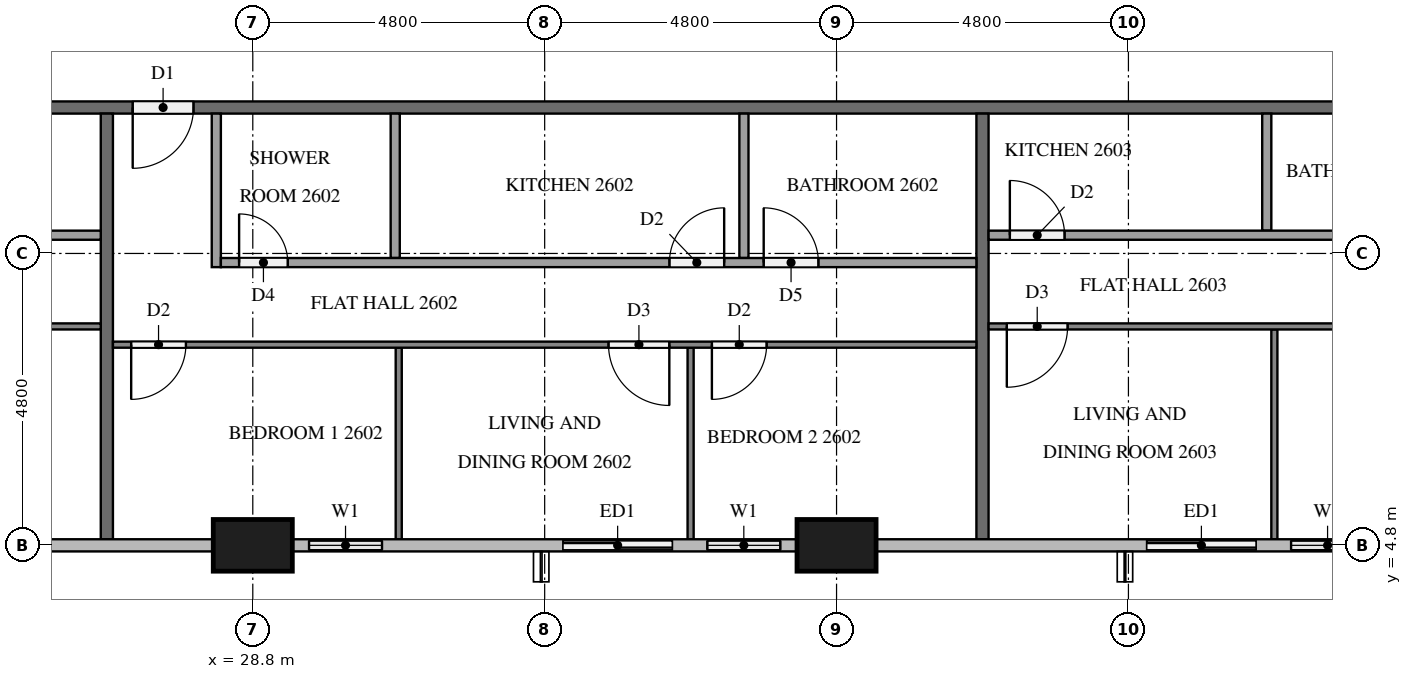
"""IFC4 building model, lengths in metres.
Left out: names, types, materials, properties, quantities, classifications, styles, units other than length and angle.
Written with IfcOpenShell. Run it as: python <this file> out.ifc"""

import sys

from ifc_helpers import new_model, si_unit, direction, frame, frame_2d, origin, origin_2d, place, context, subcontext, project, spatial, rectangle, extrude, element, fill, save


model = new_model("IFC4")
c1 = context("Model", 3, precision=1e-05, world=origin(), true_north=direction((0.0, 1.0)))
c2 = subcontext(c1, "Body", "Model", "MODEL_VIEW")
j1 = project(units=[si_unit("LENGTHUNIT", "METRE"), si_unit("PLANEANGLEUNIT", "RADIAN")], contexts=[c1])
p1 = place(None, origin())
s1 = spatial("IfcSite", under=j1, at=p1, CompositionType="ELEMENT")
p2 = place(p1, origin())
s2 = spatial("IfcBuilding", under=s1, at=p2, CompositionType="ELEMENT")
p3 = place(p2, frame((0.0, 0.0, 103.2)))
s3 = spatial("IfcBuildingStorey", under=s2, at=p3, CompositionType="ELEMENT", Elevation=103.2)
for number, where, z_axis, x_axis in (
    (1, (28.8, 4.8, 0.0), (0.0, 0.0, 1.0), (1.0, 0.0, 0.0)),
    (2, (38.4, 4.8, 0.0), (0.0, 0.0, 1.0), (1.0, 0.0, 0.0)),
):
    element("IfcColumn", number, at=place(p3, frame(where, z_axis=z_axis, x_axis=x_axis)), inside=s3, PredefinedType="COLUMN", context=c2, shape_type="SweptSolid", body=[
        extrude(rectangle(XDim=1.3, YDim=0.85, at=origin_2d()), origin(), (0.0, 0.0, 1.0), 3.2),
    ])
p4 = place(p3, frame((29.45, 4.8, 0.0), z_axis=(0.0, 0.0, 1.0), x_axis=(1.0, 0.0, 0.0)))
e3 = element("IfcWall", 3, at=p4, inside=s3, PredefinedType="SOLIDWALL", context=c2, shape_type="SweptSolid", body=[
    extrude(rectangle(XDim=1.75, YDim=0.15, at=frame_2d((0.875, 0.0))), origin(), (0.0, 0.0, 1.0), 3.2),
])
p5 = place(p4, frame((0.275, 0.0, 0.9)))
e4 = element("IfcOpeningElement", 4, at=p5, cuts=e3, PredefinedType="OPENING", context=c2, shape_type="SweptSolid", body=[
    extrude(rectangle(XDim=1.2, YDim=1.4, at=frame_2d((0.6, 0.7))), frame((0.0, 0.085, 0.0), z_axis=(0.0, -1.0, 0.0), x_axis=(1.0, 0.0, 0.0)), (0.0, 0.0, 1.0), 0.17),
])
p6 = place(p3, frame((33.6, 4.8, 0.0), z_axis=(0.0, 0.0, 1.0), x_axis=(1.0, 0.0, 0.0)))
e5 = element("IfcWall", 5, at=p6, inside=s3, PredefinedType="SOLIDWALL", context=c2, shape_type="SweptSolid", body=[
    extrude(rectangle(XDim=4.15, YDim=0.15, at=frame_2d((2.075, 0.0))), origin(), (0.0, 0.0, 1.0), 3.2),
])
p7 = place(p6, frame((0.3, 0.0, 0.0)))
e6 = element("IfcOpeningElement", 6, at=p7, cuts=e5, PredefinedType="OPENING", context=c2, shape_type="SweptSolid", body=[
    extrude(rectangle(XDim=1.8, YDim=2.4, at=frame_2d((0.9, 1.2))), frame((0.0, 0.085, 0.0), z_axis=(0.0, -1.0, 0.0), x_axis=(1.0, 0.0, 0.0)), (0.0, 0.0, 1.0), 0.17),
])
p8 = place(p6, frame((2.675, 0.0, 0.9)))
e7 = element("IfcOpeningElement", 7, at=p8, cuts=e5, PredefinedType="OPENING", context=c2, shape_type="SweptSolid", body=[
    extrude(rectangle(XDim=1.2, YDim=1.4, at=frame_2d((0.6, 0.7))), frame((0.0, 0.085, 0.0), z_axis=(0.0, -1.0, 0.0), x_axis=(1.0, 0.0, 0.0)), (0.0, 0.0, 1.0), 0.17),
])
p9 = place(p3, frame((43.2, 4.8, 0.0), z_axis=(0.0, 0.0, 1.0), x_axis=(1.0, 0.0, 0.0)))
e8 = element("IfcWall", 8, at=p9, inside=s3, PredefinedType="SOLIDWALL", context=c2, shape_type="SweptSolid", body=[
    extrude(rectangle(XDim=4.15, YDim=0.15, at=frame_2d((2.075, 0.0))), origin(), (0.0, 0.0, 1.0), 3.2),
])
p10 = place(p9, frame((0.3, 0.0, 0.0)))
e9 = element("IfcOpeningElement", 9, at=p10, cuts=e8, PredefinedType="OPENING", context=c2, shape_type="SweptSolid", body=[
    extrude(rectangle(XDim=1.8, YDim=2.4, at=frame_2d((0.9, 1.2))), frame((0.0, 0.085, 0.0), z_axis=(0.0, -1.0, 0.0), x_axis=(1.0, 0.0, 0.0)), (0.0, 0.0, 1.0), 0.17),
])
p11 = place(p9, frame((2.675, 0.0, 0.9)))
e10 = element("IfcOpeningElement", 10, at=p11, cuts=e8, PredefinedType="OPENING", context=c2, shape_type="SweptSolid", body=[
    extrude(rectangle(XDim=1.2, YDim=1.4, at=frame_2d((0.6, 0.7))), frame((0.0, 0.085, 0.0), z_axis=(0.0, -1.0, 0.0), x_axis=(1.0, 0.0, 0.0)), (0.0, 0.0, 1.0), 0.17),
])
p12 = place(p3, frame((50.5, 12.0, 0.0), z_axis=(0.0, 0.0, 1.0), x_axis=(-1.0, 0.0, 0.0)))
e11 = element("IfcWall", 11, at=p12, inside=s3, PredefinedType="PARTITIONING", context=c2, shape_type="SweptSolid", body=[
    extrude(rectangle(XDim=38.6, YDim=0.2, at=frame_2d((19.3, 0.0))), origin(), (0.0, 0.0, 1.0), 3.2),
])
p13 = place(p12, frame((37.075, 0.0, 0.0)))
e12 = element("IfcOpeningElement", 12, at=p13, cuts=e11, PredefinedType="OPENING", context=c2, shape_type="SweptSolid", body=[
    extrude(rectangle(XDim=1.0, YDim=2.1, at=frame_2d((0.5, 1.05))), frame((0.0, 0.11, 0.0), z_axis=(0.0, -1.0, 0.0), x_axis=(1.0, 0.0, 0.0)), (0.0, 0.0, 1.0), 0.22),
])
p14 = place(p12, frame((22.675, 0.0, 0.0)))
e13 = element("IfcOpeningElement", 13, at=p14, cuts=e11, PredefinedType="OPENING", context=c2, shape_type="SweptSolid", body=[
    extrude(rectangle(XDim=1.0, YDim=2.1, at=frame_2d((0.5, 1.05))), frame((0.0, 0.11, 0.0), z_axis=(0.0, -1.0, 0.0), x_axis=(1.0, 0.0, 0.0)), (0.0, 0.0, 1.0), 0.22),
])
p15 = place(p12, frame((0.525, 0.0, 0.0)))
e14 = element("IfcOpeningElement", 14, at=p15, cuts=e11, PredefinedType="OPENING", context=c2, shape_type="SweptSolid", body=[
    extrude(rectangle(XDim=1.0, YDim=2.1, at=frame_2d((0.5, 1.05))), frame((0.0, 0.11, 0.0), z_axis=(0.0, -1.0, 0.0), x_axis=(1.0, 0.0, 0.0)), (0.0, 0.0, 1.0), 0.22),
])
for number, where, z_axis, x_axis in (
    (15, (26.4, 11.9, 0.0), (0.0, 0.0, 1.0), (0.0, -1.0, 0.0)),
    (16, (40.8, 11.9, 0.0), (0.0, 0.0, 1.0), (0.0, -1.0, 0.0)),
):
    element("IfcWall", number, at=place(p3, frame(where, z_axis=z_axis, x_axis=x_axis)), inside=s3, PredefinedType="PARTITIONING", context=c2, shape_type="SweptSolid", body=[
        extrude(rectangle(XDim=7.0, YDim=0.2, at=frame_2d((3.5, 0.0))), origin(), (0.0, 0.0, 1.0), 3.2),
    ])
p16 = place(p3, frame((26.3, 8.4, 0.0), z_axis=(0.0, 0.0, 1.0), x_axis=(-1.0, 0.0, 0.0)))
e17 = element("IfcWall", 17, at=p16, inside=s3, PredefinedType="PARTITIONING", context=c2, shape_type="SweptSolid", body=[
    extrude(rectangle(XDim=14.2, YDim=0.1, at=frame_2d((7.1, 0.0))), origin(), (0.0, 0.0, 1.0), 3.2),
])
p17 = place(p16, frame((12.9, 0.0, 0.0)))
e18 = element("IfcOpeningElement", 18, at=p17, cuts=e17, PredefinedType="OPENING", context=c2, shape_type="SweptSolid", body=[
    extrude(rectangle(XDim=1.0, YDim=2.1, at=frame_2d((0.5, 1.05))), frame((0.0, 0.06, 0.0), z_axis=(0.0, -1.0, 0.0), x_axis=(1.0, 0.0, 0.0)), (0.0, 0.0, 1.0), 0.12),
])
p18 = place(p16, frame((5.05, 0.0, 0.0)))
e19 = element("IfcOpeningElement", 19, at=p18, cuts=e17, PredefinedType="OPENING", context=c2, shape_type="SweptSolid", body=[
    extrude(rectangle(XDim=0.9, YDim=2.1, at=frame_2d((0.45, 1.05))), frame((0.0, 0.06, 0.0), z_axis=(0.0, -1.0, 0.0), x_axis=(1.0, 0.0, 0.0)), (0.0, 0.0, 1.0), 0.12),
])
p19 = place(p16, frame((3.45, 0.0, 0.0)))
e20 = element("IfcOpeningElement", 20, at=p19, cuts=e17, PredefinedType="OPENING", context=c2, shape_type="SweptSolid", body=[
    extrude(rectangle(XDim=0.9, YDim=2.1, at=frame_2d((0.45, 1.05))), frame((0.0, 0.06, 0.0), z_axis=(0.0, -1.0, 0.0), x_axis=(1.0, 0.0, 0.0)), (0.0, 0.0, 1.0), 0.12),
])
p20 = place(p3, frame((13.875, 9.9, 0.0), z_axis=(0.0, 0.0, 1.0), x_axis=(1.0, 0.0, 0.0)))
e21 = element("IfcWall", 21, at=p20, inside=s3, PredefinedType="PARTITIONING", context=c2, shape_type="SweptSolid", body=[
    extrude(rectangle(XDim=12.425, YDim=0.15, at=frame_2d((6.212, 0.0))), origin(), (0.0, 0.0, 1.0), 3.2),
])
p21 = place(p20, frame((0.3, 0.0, 0.0)))
e22 = element("IfcOpeningElement", 22, at=p21, cuts=e21, PredefinedType="OPENING", context=c2, shape_type="SweptSolid", body=[
    extrude(rectangle(XDim=0.8, YDim=2.1, at=frame_2d((0.4, 1.05))), frame((0.0, 0.085, 0.0), z_axis=(0.0, -1.0, 0.0), x_axis=(1.0, 0.0, 0.0)), (0.0, 0.0, 1.0), 0.17),
])
p22 = place(p20, frame((5.465, 0.0, 0.0)))
e23 = element("IfcOpeningElement", 23, at=p22, cuts=e21, PredefinedType="OPENING", context=c2, shape_type="SweptSolid", body=[
    extrude(rectangle(XDim=0.9, YDim=2.1, at=frame_2d((0.45, 1.05))), frame((0.0, 0.085, 0.0), z_axis=(0.0, -1.0, 0.0), x_axis=(1.0, 0.0, 0.0)), (0.0, 0.0, 1.0), 0.17),
])
p23 = place(p20, frame((7.015, 0.0, 0.0)))
e24 = element("IfcOpeningElement", 24, at=p23, cuts=e21, PredefinedType="OPENING", context=c2, shape_type="SweptSolid", body=[
    extrude(rectangle(XDim=0.9, YDim=2.1, at=frame_2d((0.45, 1.05))), frame((0.0, 0.085, 0.0), z_axis=(0.0, -1.0, 0.0), x_axis=(1.0, 0.0, 0.0)), (0.0, 0.0, 1.0), 0.17),
])
for number, where, z_axis, x_axis in (
    (25, (31.2, 8.05, 0.0), (0.0, 0.0, 1.0), (0.0, -1.0, 0.0)),
    (26, (36.0, 8.05, 0.0), (0.0, 0.0, 1.0), (0.0, -1.0, 0.0)),
):
    element("IfcWall", number, at=place(p3, frame(where, z_axis=z_axis, x_axis=x_axis)), inside=s3, PredefinedType="PARTITIONING", context=c2, shape_type="SweptSolid", body=[
        extrude(rectangle(XDim=3.15, YDim=0.1, at=frame_2d((1.575, 0.0))), origin(), (0.0, 0.0, 1.0), 3.2),
    ])
p24 = place(p3, frame((40.7, 8.1, 0.0), z_axis=(0.0, 0.0, 1.0), x_axis=(-1.0, 0.0, 0.0)))
e27 = element("IfcWall", 27, at=p24, inside=s3, PredefinedType="PARTITIONING", context=c2, shape_type="SweptSolid", body=[
    extrude(rectangle(XDim=14.2, YDim=0.1, at=frame_2d((7.1, 0.0))), origin(), (0.0, 0.0, 1.0), 3.2),
])
p25 = place(p24, frame((13.0, 0.0, 0.0)))
e28 = element("IfcOpeningElement", 28, at=p25, cuts=e27, PredefinedType="OPENING", context=c2, shape_type="SweptSolid", body=[
    extrude(rectangle(XDim=0.9, YDim=2.1, at=frame_2d((0.45, 1.05))), frame((0.0, 0.06, 0.0), z_axis=(0.0, -1.0, 0.0), x_axis=(1.0, 0.0, 0.0)), (0.0, 0.0, 1.0), 0.12),
])
p26 = place(p24, frame((5.05, 0.0, 0.0)))
e29 = element("IfcOpeningElement", 29, at=p26, cuts=e27, PredefinedType="OPENING", context=c2, shape_type="SweptSolid", body=[
    extrude(rectangle(XDim=1.0, YDim=2.1, at=frame_2d((0.5, 1.05))), frame((0.0, 0.06, 0.0), z_axis=(0.0, -1.0, 0.0), x_axis=(1.0, 0.0, 0.0)), (0.0, 0.0, 1.0), 0.12),
])
p27 = place(p24, frame((3.45, 0.0, 0.0)))
e30 = element("IfcOpeningElement", 30, at=p27, cuts=e27, PredefinedType="OPENING", context=c2, shape_type="SweptSolid", body=[
    extrude(rectangle(XDim=0.9, YDim=2.1, at=frame_2d((0.45, 1.05))), frame((0.0, 0.06, 0.0), z_axis=(0.0, -1.0, 0.0), x_axis=(1.0, 0.0, 0.0)), (0.0, 0.0, 1.0), 0.12),
])
for number, where, z_axis, x_axis in (
    (31, (31.142, 11.9, 0.0), (0.0, 0.0, 1.0), (0.0, -1.0, 0.0)),
    (32, (36.877, 11.9, 0.0), (0.0, 0.0, 1.0), (0.0, -1.0, 0.0)),
):
    element("IfcWall", number, at=place(p3, frame(where, z_axis=z_axis, x_axis=x_axis)), inside=s3, PredefinedType="PARTITIONING", context=c2, shape_type="SweptSolid", body=[
        extrude(rectangle(XDim=2.375, YDim=0.15, at=frame_2d((1.188, 0.0))), origin(), (0.0, 0.0, 1.0), 3.2),
    ])
p28 = place(p3, frame((28.2, 11.9, 0.0), z_axis=(0.0, 0.0, 1.0), x_axis=(0.0, -1.0, 0.0)))
e33 = element("IfcWall", 33, at=p28, inside=s3, PredefinedType="PARTITIONING", context=c2, shape_type="SweptSolid", body=[
    extrude(rectangle(XDim=2.525, YDim=0.15, at=frame_2d((1.262, 0.0))), origin(), (0.0, 0.0, 1.0), 3.2),
])
p29 = place(p3, frame((28.275, 9.45, 0.0), z_axis=(0.0, 0.0, 1.0), x_axis=(1.0, 0.0, 0.0)))
e34 = element("IfcWall", 34, at=p29, inside=s3, PredefinedType="PARTITIONING", context=c2, shape_type="SweptSolid", body=[
    extrude(rectangle(XDim=12.425, YDim=0.15, at=frame_2d((6.212, 0.0))), origin(), (0.0, 0.0, 1.0), 3.2),
])
p30 = place(p29, frame((0.3, 0.0, 0.0)))
e35 = element("IfcOpeningElement", 35, at=p30, cuts=e34, PredefinedType="OPENING", context=c2, shape_type="SweptSolid", body=[
    extrude(rectangle(XDim=0.8, YDim=2.1, at=frame_2d((0.4, 1.05))), frame((0.0, 0.085, 0.0), z_axis=(0.0, -1.0, 0.0), x_axis=(1.0, 0.0, 0.0)), (0.0, 0.0, 1.0), 0.17),
])
p31 = place(p29, frame((7.377, 0.0, 0.0)))
e36 = element("IfcOpeningElement", 36, at=p31, cuts=e34, PredefinedType="OPENING", context=c2, shape_type="SweptSolid", body=[
    extrude(rectangle(XDim=0.9, YDim=2.1, at=frame_2d((0.45, 1.05))), frame((0.0, 0.085, 0.0), z_axis=(0.0, -1.0, 0.0), x_axis=(1.0, 0.0, 0.0)), (0.0, 0.0, 1.0), 0.17),
])
p32 = place(p29, frame((8.927, 0.0, 0.0)))
e37 = element("IfcOpeningElement", 37, at=p32, cuts=e34, PredefinedType="OPENING", context=c2, shape_type="SweptSolid", body=[
    extrude(rectangle(XDim=0.9, YDim=2.1, at=frame_2d((0.45, 1.05))), frame((0.0, 0.085, 0.0), z_axis=(0.0, -1.0, 0.0), x_axis=(1.0, 0.0, 0.0)), (0.0, 0.0, 1.0), 0.17),
])
p33 = place(p3, frame((45.6, 8.35, 0.0), z_axis=(0.0, 0.0, 1.0), x_axis=(0.0, -1.0, 0.0)))
e38 = element("IfcWall", 38, at=p33, inside=s3, PredefinedType="PARTITIONING", context=c2, shape_type="SweptSolid", body=[
    extrude(rectangle(XDim=3.45, YDim=0.1, at=frame_2d((1.725, 0.0))), origin(), (0.0, 0.0, 1.0), 3.2),
])
p34 = place(p3, frame((50.3, 8.4, 0.0), z_axis=(0.0, 0.0, 1.0), x_axis=(-1.0, 0.0, 0.0)))
e39 = element("IfcWall", 39, at=p34, inside=s3, PredefinedType="PARTITIONING", context=c2, shape_type="SweptSolid", body=[
    extrude(rectangle(XDim=9.4, YDim=0.1, at=frame_2d((4.7, 0.0))), origin(), (0.0, 0.0, 1.0), 3.2),
])
p35 = place(p34, frame((0.3, 0.0, 0.0)))
e40 = element("IfcOpeningElement", 40, at=p35, cuts=e39, PredefinedType="OPENING", context=c2, shape_type="SweptSolid", body=[
    extrude(rectangle(XDim=0.9, YDim=2.1, at=frame_2d((0.45, 1.05))), frame((0.0, 0.06, 0.0), z_axis=(0.0, -1.0, 0.0), x_axis=(1.0, 0.0, 0.0)), (0.0, 0.0, 1.0), 0.12),
])
p36 = place(p34, frame((8.1, 0.0, 0.0)))
e41 = element("IfcOpeningElement", 41, at=p36, cuts=e39, PredefinedType="OPENING", context=c2, shape_type="SweptSolid", body=[
    extrude(rectangle(XDim=1.0, YDim=2.1, at=frame_2d((0.5, 1.05))), frame((0.0, 0.06, 0.0), z_axis=(0.0, -1.0, 0.0), x_axis=(1.0, 0.0, 0.0)), (0.0, 0.0, 1.0), 0.12),
])
p37 = place(p3, frame((45.475, 11.9, 0.0), z_axis=(0.0, 0.0, 1.0), x_axis=(0.0, -1.0, 0.0)))
e42 = element("IfcWall", 42, at=p37, inside=s3, PredefinedType="PARTITIONING", context=c2, shape_type="SweptSolid", body=[
    extrude(rectangle(XDim=1.925, YDim=0.15, at=frame_2d((0.962, 0.0))), origin(), (0.0, 0.0, 1.0), 3.2),
])
p38 = place(p3, frame((40.9, 9.9, 0.0), z_axis=(0.0, 0.0, 1.0), x_axis=(1.0, 0.0, 0.0)))
e43 = element("IfcWall", 43, at=p38, inside=s3, PredefinedType="PARTITIONING", context=c2, shape_type="SweptSolid", body=[
    extrude(rectangle(XDim=7.625, YDim=0.15, at=frame_2d((3.812, 0.0))), origin(), (0.0, 0.0, 1.0), 3.2),
])
p39 = place(p38, frame((6.525, 0.0, 0.0)))
e44 = element("IfcOpeningElement", 44, at=p39, cuts=e43, PredefinedType="OPENING", context=c2, shape_type="SweptSolid", body=[
    extrude(rectangle(XDim=0.8, YDim=2.1, at=frame_2d((0.4, 1.05))), frame((0.0, 0.085, 0.0), z_axis=(0.0, -1.0, 0.0), x_axis=(1.0, 0.0, 0.0)), (0.0, 0.0, 1.0), 0.17),
])
p40 = place(p38, frame((0.35, 0.0, 0.0)))
e45 = element("IfcOpeningElement", 45, at=p40, cuts=e43, PredefinedType="OPENING", context=c2, shape_type="SweptSolid", body=[
    extrude(rectangle(XDim=0.9, YDim=2.1, at=frame_2d((0.45, 1.05))), frame((0.0, 0.085, 0.0), z_axis=(0.0, -1.0, 0.0), x_axis=(1.0, 0.0, 0.0)), (0.0, 0.0, 1.0), 0.17),
])
p41 = place(p5, origin())
e46 = element("IfcWindow", 46, at=p41, inside=s3, PartitioningType="SINGLE_PANEL", PredefinedType="WINDOW", context=c2, shape_type="SweptSolid", body=[
    extrude(rectangle(XDim=1.2, YDim=1.4, at=frame_2d((0.6, 0.7))), frame((0.0, 0.03, 0.0), z_axis=(0.0, -1.0, 0.0), x_axis=(1.0, 0.0, 0.0)), (0.0, 0.0, 1.0), 0.06),
])
fill(e4, e46)
p42 = place(p7, origin())
e47 = element("IfcDoor", 47, at=p42, inside=s3, OperationType="SLIDING_TO_RIGHT", PredefinedType="DOOR", context=c2, shape_type="SweptSolid", body=[
    extrude(rectangle(XDim=1.8, YDim=2.4, at=frame_2d((0.9, 1.2))), frame((0.0, 0.025, 0.0), z_axis=(0.0, -1.0, 0.0), x_axis=(1.0, 0.0, 0.0)), (0.0, 0.0, 1.0), 0.05),
])
fill(e6, e47)
p43 = place(p8, origin())
e48 = element("IfcWindow", 48, at=p43, inside=s3, PartitioningType="SINGLE_PANEL", PredefinedType="WINDOW", context=c2, shape_type="SweptSolid", body=[
    extrude(rectangle(XDim=1.2, YDim=1.4, at=frame_2d((0.6, 0.7))), frame((0.0, 0.03, 0.0), z_axis=(0.0, -1.0, 0.0), x_axis=(1.0, 0.0, 0.0)), (0.0, 0.0, 1.0), 0.06),
])
fill(e7, e48)
p44 = place(p10, origin())
e49 = element("IfcDoor", 49, at=p44, inside=s3, OperationType="SLIDING_TO_LEFT", PredefinedType="DOOR", context=c2, shape_type="SweptSolid", body=[
    extrude(rectangle(XDim=1.8, YDim=2.4, at=frame_2d((0.9, 1.2))), frame((0.0, 0.025, 0.0), z_axis=(0.0, -1.0, 0.0), x_axis=(1.0, 0.0, 0.0)), (0.0, 0.0, 1.0), 0.05),
])
fill(e9, e49)
p45 = place(p11, origin())
e50 = element("IfcWindow", 50, at=p45, inside=s3, PartitioningType="SINGLE_PANEL", PredefinedType="WINDOW", context=c2, shape_type="SweptSolid", body=[
    extrude(rectangle(XDim=1.2, YDim=1.4, at=frame_2d((0.6, 0.7))), frame((0.0, 0.03, 0.0), z_axis=(0.0, -1.0, 0.0), x_axis=(1.0, 0.0, 0.0)), (0.0, 0.0, 1.0), 0.06),
])
fill(e10, e50)
p46 = place(p14, origin())
e51 = element("IfcDoor", 51, at=p46, inside=s3, OperationType="SINGLE_SWING_RIGHT", PredefinedType="DOOR", context=c2, shape_type="SweptSolid", body=[
    extrude(rectangle(XDim=1.0, YDim=2.1, at=frame_2d((0.5, 1.05))), frame((0.0, 0.025, 0.0), z_axis=(0.0, -1.0, 0.0), x_axis=(1.0, 0.0, 0.0)), (0.0, 0.0, 1.0), 0.05),
])
fill(e13, e51)
p47 = place(p25, origin())
e52 = element("IfcDoor", 52, at=p47, inside=s3, OperationType="SINGLE_SWING_RIGHT", PredefinedType="DOOR", context=c2, shape_type="SweptSolid", body=[
    extrude(rectangle(XDim=0.9, YDim=2.1, at=frame_2d((0.45, 1.05))), frame((0.0, 0.025, 0.0), z_axis=(0.0, -1.0, 0.0), x_axis=(1.0, 0.0, 0.0)), (0.0, 0.0, 1.0), 0.05),
])
fill(e28, e52)
p48 = place(p26, origin())
e53 = element("IfcDoor", 53, at=p48, inside=s3, OperationType="SINGLE_SWING_LEFT", PredefinedType="DOOR", context=c2, shape_type="SweptSolid", body=[
    extrude(rectangle(XDim=1.0, YDim=2.1, at=frame_2d((0.5, 1.05))), frame((0.0, 0.025, 0.0), z_axis=(0.0, -1.0, 0.0), x_axis=(1.0, 0.0, 0.0)), (0.0, 0.0, 1.0), 0.05),
])
fill(e29, e53)
p49 = place(p27, origin())
e54 = element("IfcDoor", 54, at=p49, inside=s3, OperationType="SINGLE_SWING_RIGHT", PredefinedType="DOOR", context=c2, shape_type="SweptSolid", body=[
    extrude(rectangle(XDim=0.9, YDim=2.1, at=frame_2d((0.45, 1.05))), frame((0.0, 0.025, 0.0), z_axis=(0.0, -1.0, 0.0), x_axis=(1.0, 0.0, 0.0)), (0.0, 0.0, 1.0), 0.05),
])
fill(e30, e54)
p50 = place(p30, origin())
e55 = element("IfcDoor", 55, at=p50, inside=s3, OperationType="SINGLE_SWING_LEFT", PredefinedType="DOOR", context=c2, shape_type="SweptSolid", body=[
    extrude(rectangle(XDim=0.8, YDim=2.1, at=frame_2d((0.4, 1.05))), frame((0.0, 0.025, 0.0), z_axis=(0.0, -1.0, 0.0), x_axis=(1.0, 0.0, 0.0)), (0.0, 0.0, 1.0), 0.05),
])
fill(e35, e55)
p51 = place(p31, origin())
e56 = element("IfcDoor", 56, at=p51, inside=s3, OperationType="SINGLE_SWING_RIGHT", PredefinedType="DOOR", context=c2, shape_type="SweptSolid", body=[
    extrude(rectangle(XDim=0.9, YDim=2.1, at=frame_2d((0.45, 1.05))), frame((0.0, 0.025, 0.0), z_axis=(0.0, -1.0, 0.0), x_axis=(1.0, 0.0, 0.0)), (0.0, 0.0, 1.0), 0.05),
])
fill(e36, e56)
p52 = place(p32, origin())
e57 = element("IfcDoor", 57, at=p52, inside=s3, OperationType="SINGLE_SWING_LEFT", PredefinedType="DOOR", context=c2, shape_type="SweptSolid", body=[
    extrude(rectangle(XDim=0.9, YDim=2.1, at=frame_2d((0.45, 1.05))), frame((0.0, 0.025, 0.0), z_axis=(0.0, -1.0, 0.0), x_axis=(1.0, 0.0, 0.0)), (0.0, 0.0, 1.0), 0.05),
])
fill(e37, e57)
p53 = place(p36, origin())
e58 = element("IfcDoor", 58, at=p53, inside=s3, OperationType="SINGLE_SWING_RIGHT", PredefinedType="DOOR", context=c2, shape_type="SweptSolid", body=[
    extrude(rectangle(XDim=1.0, YDim=2.1, at=frame_2d((0.5, 1.05))), frame((0.0, 0.025, 0.0), z_axis=(0.0, -1.0, 0.0), x_axis=(1.0, 0.0, 0.0)), (0.0, 0.0, 1.0), 0.05),
])
fill(e41, e58)
p54 = place(p40, origin())
e59 = element("IfcDoor", 59, at=p54, inside=s3, OperationType="SINGLE_SWING_LEFT", PredefinedType="DOOR", context=c2, shape_type="SweptSolid", body=[
    extrude(rectangle(XDim=0.9, YDim=2.1, at=frame_2d((0.45, 1.05))), frame((0.0, 0.025, 0.0), z_axis=(0.0, -1.0, 0.0), x_axis=(1.0, 0.0, 0.0)), (0.0, 0.0, 1.0), 0.05),
])
fill(e45, e59)
save(model, sys.argv[1])
